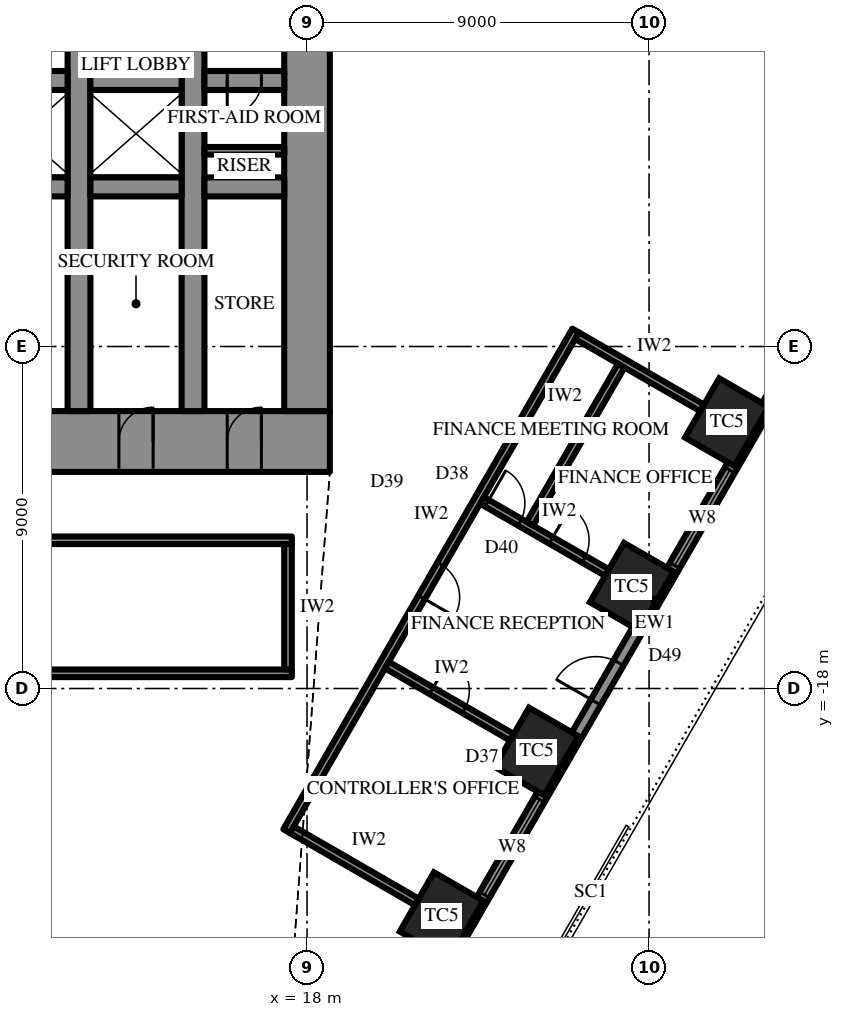
"""IFC4 building model, lengths in metres.
Left out: names, types, materials, properties, quantities, classifications, styles, units other than length and angle.
Written with IfcOpenShell. Run it as: python <this file> out.ifc"""

import sys

from ifc_helpers import new_model, si_unit, direction, frame, frame_2d, origin, origin_2d, place, context, subcontext, project, spatial, rectangle, extrude, element, fill, save


model = new_model("IFC4")
c1 = context("Model", 3, precision=1e-05, world=origin(), true_north=direction((0.0, 1.0)))
c2 = subcontext(c1, "Body", "Model", "MODEL_VIEW")
j1 = project(units=[si_unit("LENGTHUNIT", "METRE"), si_unit("PLANEANGLEUNIT", "RADIAN")], contexts=[c1])
p1 = place(None, origin())
s1 = spatial("IfcSite", under=j1, at=p1, CompositionType="ELEMENT")
p2 = place(p1, origin())
s2 = spatial("IfcBuilding", under=s1, at=p2, CompositionType="ELEMENT")
p3 = place(p2, frame((0.0, 0.0, 127.9)))
s3 = spatial("IfcBuildingStorey", under=s2, at=p3, CompositionType="ELEMENT", Elevation=127.9)
for number, where, z_axis, x_axis in (
    (1, (21.54, -23.992, 0.0), (0.0, 0.0, 1.0), (0.5, 0.866, 0.0)),
    (2, (24.042, -19.658, 0.0), (0.0, 0.0, 1.0), (0.5, 0.866, 0.0)),
    (3, (26.544, -15.325, 0.0), (0.0, 0.0, 1.0), (0.5, 0.866, 0.0)),
    (4, (29.045, -10.992, 0.0), (0.0, 0.0, 1.0), (0.5, 0.866, 0.0)),
):
    element("IfcColumn", number, at=place(p3, frame(where, z_axis=z_axis, x_axis=x_axis)), inside=s3, PredefinedType="COLUMN", context=c2, shape_type="SweptSolid", body=[
        extrude(rectangle(XDim=1.8, YDim=1.5, at=origin_2d()), origin(), (0.0, 0.0, 1.0), 4.2),
    ])
p4 = place(p3, frame((18.6, -11.5, 0.0), z_axis=(0.0, 0.0, 1.0), x_axis=(-1.0, 0.0, 0.0)))
e5 = element("IfcWall", 5, at=p4, inside=s3, PredefinedType="SHEAR", context=c2, shape_type="SweptSolid", body=[
    extrude(rectangle(XDim=37.2, YDim=1.6, at=frame_2d((18.6, 0.0))), origin(), (0.0, 0.0, 1.0), 4.2),
])
p5 = place(p4, frame((19.45, 0.0, 0.0)))
e6 = element("IfcOpeningElement", 6, at=p5, cuts=e5, PredefinedType="OPENING", context=c2, shape_type="SweptSolid", body=[
    extrude(rectangle(XDim=0.9, YDim=2.2, at=frame_2d((0.45, 1.1))), frame((0.0, 0.81, 0.0), z_axis=(0.0, -1.0, 0.0), x_axis=(1.0, 0.0, 0.0)), (0.0, 0.0, 1.0), 1.62),
])
p6 = place(p4, frame((22.45, 0.0, 0.0)))
e7 = element("IfcOpeningElement", 7, at=p6, cuts=e5, PredefinedType="OPENING", context=c2, shape_type="SweptSolid", body=[
    extrude(rectangle(XDim=0.9, YDim=2.2, at=frame_2d((0.45, 1.1))), frame((0.0, 0.81, 0.0), z_axis=(0.0, -1.0, 0.0), x_axis=(1.0, 0.0, 0.0)), (0.0, 0.0, 1.0), 1.62),
])
p7 = place(p4, frame((25.5, 0.0, 0.0)))
e8 = element("IfcOpeningElement", 8, at=p7, cuts=e5, PredefinedType="OPENING", context=c2, shape_type="SweptSolid", body=[
    extrude(rectangle(XDim=1.0, YDim=2.2, at=frame_2d((0.5, 1.1))), frame((0.0, 0.81, 0.0), z_axis=(0.0, -1.0, 0.0), x_axis=(1.0, 0.0, 0.0)), (0.0, 0.0, 1.0), 1.62),
])
p8 = place(p4, frame((1.8, 0.0, 0.0)))
e9 = element("IfcOpeningElement", 9, at=p8, cuts=e5, PredefinedType="OPENING", context=c2, shape_type="SweptSolid", body=[
    extrude(rectangle(XDim=0.9, YDim=2.2, at=frame_2d((0.45, 1.1))), frame((0.0, 0.81, 0.0), z_axis=(0.0, -1.0, 0.0), x_axis=(1.0, 0.0, 0.0)), (0.0, 0.0, 1.0), 1.62),
])
p9 = place(p4, frame((4.65, 0.0, 0.0)))
e10 = element("IfcOpeningElement", 10, at=p9, cuts=e5, PredefinedType="OPENING", context=c2, shape_type="SweptSolid", body=[
    extrude(rectangle(XDim=0.9, YDim=2.2, at=frame_2d((0.45, 1.1))), frame((0.0, 0.81, 0.0), z_axis=(0.0, -1.0, 0.0), x_axis=(1.0, 0.0, 0.0)), (0.0, 0.0, 1.0), 1.62),
])
p10 = place(p4, frame((7.75, 0.0, 0.0)))
e11 = element("IfcOpeningElement", 11, at=p10, cuts=e5, PredefinedType="OPENING", context=c2, shape_type="SweptSolid", body=[
    extrude(rectangle(XDim=0.9, YDim=2.2, at=frame_2d((0.45, 1.1))), frame((0.0, 0.81, 0.0), z_axis=(0.0, -1.0, 0.0), x_axis=(1.0, 0.0, 0.0)), (0.0, 0.0, 1.0), 1.62),
])
p11 = place(p4, frame((28.55, 0.0, 0.0)))
e12 = element("IfcOpeningElement", 12, at=p11, cuts=e5, PredefinedType="OPENING", context=c2, shape_type="SweptSolid", body=[
    extrude(rectangle(XDim=0.9, YDim=2.2, at=frame_2d((0.45, 1.1))), frame((0.0, 0.81, 0.0), z_axis=(0.0, -1.0, 0.0), x_axis=(1.0, 0.0, 0.0)), (0.0, 0.0, 1.0), 1.62),
])
p12 = place(p4, frame((31.65, 0.0, 0.0)))
e13 = element("IfcOpeningElement", 13, at=p12, cuts=e5, PredefinedType="OPENING", context=c2, shape_type="SweptSolid", body=[
    extrude(rectangle(XDim=0.9, YDim=2.2, at=frame_2d((0.45, 1.1))), frame((0.0, 0.81, 0.0), z_axis=(0.0, -1.0, 0.0), x_axis=(1.0, 0.0, 0.0)), (0.0, 0.0, 1.0), 1.62),
])
p13 = place(p4, frame((34.5, 0.0, 0.0)))
e14 = element("IfcOpeningElement", 14, at=p13, cuts=e5, PredefinedType="OPENING", context=c2, shape_type="SweptSolid", body=[
    extrude(rectangle(XDim=0.9, YDim=2.2, at=frame_2d((0.45, 1.1))), frame((0.0, 0.81, 0.0), z_axis=(0.0, -1.0, 0.0), x_axis=(1.0, 0.0, 0.0)), (0.0, 0.0, 1.0), 1.62),
])
p14 = place(p3, frame((18.0, -10.7, 0.0), z_axis=(0.0, 0.0, 1.0), x_axis=(0.0, 1.0, 0.0)))
e15 = element("IfcWall", 15, at=p14, inside=s3, PredefinedType="SHEAR", context=c2, shape_type="SweptSolid", body=[
    extrude(rectangle(XDim=21.4, YDim=1.2, at=frame_2d((10.7, 0.0))), origin(), (0.0, 0.0, 1.0), 4.2),
])
p15 = place(p14, frame((9.8, 0.0, 0.0)))
e16 = element("IfcOpeningElement", 16, at=p15, cuts=e15, PredefinedType="OPENING", context=c2, shape_type="SweptSolid", body=[
    extrude(rectangle(XDim=1.8, YDim=2.4, at=frame_2d((0.9, 1.2))), frame((0.0, 0.61, 0.0), z_axis=(0.0, -1.0, 0.0), x_axis=(1.0, 0.0, 0.0)), (0.0, 0.0, 1.0), 1.22),
])
p16 = place(p3, frame((12.0, -10.7, 0.0), z_axis=(0.0, 0.0, 1.0), x_axis=(0.0, 1.0, 0.0)))
e17 = element("IfcWall", 17, at=p16, inside=s3, PredefinedType="SHEAR", context=c2, shape_type="SweptSolid", body=[
    extrude(rectangle(XDim=21.4, YDim=0.6, at=frame_2d((10.7, 0.0))), origin(), (0.0, 0.0, 1.0), 4.2),
])
p17 = place(p16, frame((9.8, 0.0, 0.0)))
e18 = element("IfcOpeningElement", 18, at=p17, cuts=e17, PredefinedType="OPENING", context=c2, shape_type="SweptSolid", body=[
    extrude(rectangle(XDim=1.8, YDim=2.4, at=frame_2d((0.9, 1.2))), frame((0.0, 0.31, 0.0), z_axis=(0.0, -1.0, 0.0), x_axis=(1.0, 0.0, 0.0)), (0.0, 0.0, 1.0), 0.62),
])
p18 = place(p3, frame((15.0, -10.7, 0.0), z_axis=(0.0, 0.0, 1.0), x_axis=(0.0, 1.0, 0.0)))
e19 = element("IfcWall", 19, at=p18, inside=s3, PredefinedType="SHEAR", context=c2, shape_type="SweptSolid", body=[
    extrude(rectangle(XDim=21.4, YDim=0.6, at=frame_2d((10.7, 0.0))), origin(), (0.0, 0.0, 1.0), 4.2),
])
p19 = place(p18, frame((9.8, 0.0, 0.0)))
e20 = element("IfcOpeningElement", 20, at=p19, cuts=e19, PredefinedType="OPENING", context=c2, shape_type="SweptSolid", body=[
    extrude(rectangle(XDim=1.8, YDim=2.4, at=frame_2d((0.9, 1.2))), frame((0.0, 0.31, 0.0), z_axis=(0.0, -1.0, 0.0), x_axis=(1.0, 0.0, 0.0)), (0.0, 0.0, 1.0), 0.62),
])
p20 = place(p3, frame((17.4, -2.0, 0.0), z_axis=(0.0, 0.0, 1.0), x_axis=(-1.0, 0.0, 0.0)))
e21 = element("IfcWall", 21, at=p20, inside=s3, PredefinedType="SHEAR", context=c2, shape_type="SweptSolid", body=[
    extrude(rectangle(XDim=2.1, YDim=0.5, at=frame_2d((1.05, 0.0))), origin(), (0.0, 0.0, 1.0), 4.2),
])
p21 = place(p20, frame((0.6, 0.0, 0.0)))
e22 = element("IfcOpeningElement", 22, at=p21, cuts=e21, PredefinedType="OPENING", context=c2, shape_type="SweptSolid", body=[
    extrude(rectangle(XDim=0.9, YDim=2.2, at=frame_2d((0.45, 1.1))), frame((0.0, 0.26, 0.0), z_axis=(0.0, -1.0, 0.0), x_axis=(1.0, 0.0, 0.0)), (0.0, 0.0, 1.0), 0.52),
])
p22 = place(p3, frame((14.7, -2.0, 0.0), z_axis=(0.0, 0.0, 1.0), x_axis=(-1.0, 0.0, 0.0)))
e23 = element("IfcWall", 23, at=p22, inside=s3, PredefinedType="SHEAR", context=c2, shape_type="SweptSolid", body=[
    extrude(rectangle(XDim=2.4, YDim=0.5, at=frame_2d((1.2, 0.0))), origin(), (0.0, 0.0, 1.0), 4.2),
])
p23 = place(p3, frame((11.7, -2.0, 0.0), z_axis=(0.0, 0.0, 1.0), x_axis=(-1.0, 0.0, 0.0)))
e24 = element("IfcWall", 24, at=p23, inside=s3, PredefinedType="SHEAR", context=c2, shape_type="SweptSolid", body=[
    extrude(rectangle(XDim=5.9, YDim=0.5, at=frame_2d((2.95, 0.0))), origin(), (0.0, 0.0, 1.0), 4.2),
])
p24 = place(p3, frame((17.4, -4.8, 0.0), z_axis=(0.0, 0.0, 1.0), x_axis=(-1.0, 0.0, 0.0)))
e25 = element("IfcWall", 25, at=p24, inside=s3, PredefinedType="SHEAR", context=c2, shape_type="SweptSolid", body=[
    extrude(rectangle(XDim=2.1, YDim=0.5, at=frame_2d((1.05, 0.0))), origin(), (0.0, 0.0, 1.0), 4.2),
])
p25 = place(p3, frame((14.7, -4.8, 0.0), z_axis=(0.0, 0.0, 1.0), x_axis=(-1.0, 0.0, 0.0)))
e26 = element("IfcWall", 26, at=p25, inside=s3, PredefinedType="SHEAR", context=c2, shape_type="SweptSolid", body=[
    extrude(rectangle(XDim=2.4, YDim=0.5, at=frame_2d((1.2, 0.0))), origin(), (0.0, 0.0, 1.0), 4.2),
])
p26 = place(p3, frame((11.7, -4.8, 0.0), z_axis=(0.0, 0.0, 1.0), x_axis=(-1.0, 0.0, 0.0)))
e27 = element("IfcWall", 27, at=p26, inside=s3, PredefinedType="SHEAR", context=c2, shape_type="SweptSolid", body=[
    extrude(rectangle(XDim=23.4, YDim=0.5, at=frame_2d((11.7, 0.0))), origin(), (0.0, 0.0, 1.0), 4.2),
])
p27 = place(p26, frame((6.6, 0.0, 0.0)))
e28 = element("IfcOpeningElement", 28, at=p27, cuts=e27, PredefinedType="OPENING", context=c2, shape_type="SweptSolid", body=[
    extrude(rectangle(XDim=1.2, YDim=2.2, at=frame_2d((0.6, 1.1))), frame((0.0, 0.26, 0.0), z_axis=(0.0, -1.0, 0.0), x_axis=(1.0, 0.0, 0.0)), (0.0, 0.0, 1.0), 0.52),
])
p28 = place(p26, frame((3.6, 0.0, 0.0)))
e29 = element("IfcOpeningElement", 29, at=p28, cuts=e27, PredefinedType="OPENING", context=c2, shape_type="SweptSolid", body=[
    extrude(rectangle(XDim=1.2, YDim=2.2, at=frame_2d((0.6, 1.1))), frame((0.0, 0.26, 0.0), z_axis=(0.0, -1.0, 0.0), x_axis=(1.0, 0.0, 0.0)), (0.0, 0.0, 1.0), 0.52),
])
p29 = place(p3, frame((19.644, -28.675, 0.0), z_axis=(0.0, 0.0, 1.0), x_axis=(0.500003084452, 0.866023622968, 0.0)))
e30 = element("IfcWall", 30, at=p29, inside=s3, PredefinedType="SOLIDWALL", context=c2, shape_type="SweptSolid", body=[
    extrude(rectangle(XDim=30.022, YDim=0.3, at=frame_2d((15.011, 0.0))), origin(), (0.0, 0.0, 1.0), 2.3),
])
p30 = place(p29, frame((1.052, 0.0, 0.6)))
e31 = element("IfcOpeningElement", 31, at=p30, cuts=e30, PredefinedType="OPENING", context=c2, shape_type="SweptSolid", body=[
    extrude(rectangle(XDim=2.9, YDim=1.45, at=frame_2d((1.45, 0.725))), frame((0.0, 0.16, 0.0), z_axis=(0.0, -1.0, 0.0), x_axis=(1.0, 0.0, 0.0)), (0.0, 0.0, 1.0), 0.32),
])
p31 = place(p29, frame((6.056, 0.0, 0.6)))
e32 = element("IfcOpeningElement", 32, at=p31, cuts=e30, PredefinedType="OPENING", context=c2, shape_type="SweptSolid", body=[
    extrude(rectangle(XDim=2.9, YDim=1.45, at=frame_2d((1.45, 0.725))), frame((0.0, 0.16, 0.0), z_axis=(0.0, -1.0, 0.0), x_axis=(1.0, 0.0, 0.0)), (0.0, 0.0, 1.0), 0.32),
])
p32 = place(p29, frame((11.909, 0.0, 0.0)))
e33 = element("IfcOpeningElement", 33, at=p32, cuts=e30, PredefinedType="OPENING", context=c2, shape_type="SweptSolid", body=[
    extrude(rectangle(XDim=1.2, YDim=2.2, at=frame_2d((0.6, 1.1))), frame((0.0, 0.16, 0.0), z_axis=(0.0, -1.0, 0.0), x_axis=(1.0, 0.0, 0.0)), (0.0, 0.0, 1.0), 0.32),
])
p33 = place(p29, frame((16.063, 0.0, 0.6)))
e34 = element("IfcOpeningElement", 34, at=p33, cuts=e30, PredefinedType="OPENING", context=c2, shape_type="SweptSolid", body=[
    extrude(rectangle(XDim=2.9, YDim=1.45, at=frame_2d((1.45, 0.725))), frame((0.0, 0.16, 0.0), z_axis=(0.0, -1.0, 0.0), x_axis=(1.0, 0.0, 0.0)), (0.0, 0.0, 1.0), 0.32),
])
p34 = place(p29, frame((21.067, 0.0, 0.6)))
e35 = element("IfcOpeningElement", 35, at=p34, cuts=e30, PredefinedType="OPENING", context=c2, shape_type="SweptSolid", body=[
    extrude(rectangle(XDim=2.9, YDim=1.45, at=frame_2d((1.45, 0.725))), frame((0.0, 0.16, 0.0), z_axis=(0.0, -1.0, 0.0), x_axis=(1.0, 0.0, 0.0)), (0.0, 0.0, 1.0), 0.32),
])
p35 = place(p29, frame((26.07, 0.0, 0.6)))
e36 = element("IfcOpeningElement", 36, at=p35, cuts=e30, PredefinedType="OPENING", context=c2, shape_type="SweptSolid", body=[
    extrude(rectangle(XDim=2.9, YDim=1.45, at=frame_2d((1.45, 0.725))), frame((0.0, 0.16, 0.0), z_axis=(0.0, -1.0, 0.0), x_axis=(1.0, 0.0, 0.0)), (0.0, 0.0, 1.0), 0.32),
])
p36 = place(p3, frame((17.4, -3.85, 0.0), z_axis=(0.0, 0.0, 1.0), x_axis=(-1.0, 0.0, 0.0)))
e37 = element("IfcWall", 37, at=p36, inside=s3, PredefinedType="PARTITIONING", context=c2, shape_type="SweptSolid", body=[
    extrude(rectangle(XDim=2.1, YDim=0.2, at=frame_2d((1.05, 0.0))), origin(), (0.0, 0.0, 1.0), 4.0),
])
p37 = place(p3, frame((17.6, -14.1, 0.0), z_axis=(0.0, 0.0, 1.0), x_axis=(-1.0, 0.0, 0.0)))
e38 = element("IfcWall", 38, at=p37, inside=s3, PredefinedType="PARTITIONING", context=c2, shape_type="SweptSolid", body=[
    extrude(rectangle(XDim=35.2, YDim=0.2, at=frame_2d((17.6, 0.0))), origin(), (0.0, 0.0, 1.0), 4.0),
])
p38 = place(p3, frame((17.6, -17.6, 0.0), z_axis=(0.0, 0.0, 1.0), x_axis=(-1.0, 0.0, 0.0)))
e39 = element("IfcWall", 39, at=p38, inside=s3, PredefinedType="PARTITIONING", context=c2, shape_type="SweptSolid", body=[
    extrude(rectangle(XDim=35.2, YDim=0.2, at=frame_2d((17.6, 0.0))), origin(), (0.0, 0.0, 1.0), 4.0),
])
p39 = place(p38, frame((7.95, 0.0, 0.0)))
e40 = element("IfcOpeningElement", 40, at=p39, cuts=e39, PredefinedType="OPENING", context=c2, shape_type="SweptSolid", body=[
    extrude(rectangle(XDim=1.8, YDim=2.4, at=frame_2d((0.9, 1.2))), frame((0.0, 0.11, 0.0), z_axis=(0.0, -1.0, 0.0), x_axis=(1.0, 0.0, 0.0)), (0.0, 0.0, 1.0), 0.22),
])
p40 = place(p38, frame((25.45, 0.0, 0.0)))
e41 = element("IfcOpeningElement", 41, at=p40, cuts=e39, PredefinedType="OPENING", context=c2, shape_type="SweptSolid", body=[
    extrude(rectangle(XDim=1.8, YDim=2.4, at=frame_2d((0.9, 1.2))), frame((0.0, 0.11, 0.0), z_axis=(0.0, -1.0, 0.0), x_axis=(1.0, 0.0, 0.0)), (0.0, 0.0, 1.0), 0.22),
])
p41 = place(p3, frame((17.5, -14.2, 0.0), z_axis=(0.0, 0.0, 1.0), x_axis=(0.0, -1.0, 0.0)))
e42 = element("IfcWall", 42, at=p41, inside=s3, PredefinedType="PARTITIONING", context=c2, shape_type="SweptSolid", body=[
    extrude(rectangle(XDim=3.3, YDim=0.2, at=frame_2d((1.65, 0.0))), origin(), (0.0, 0.0, 1.0), 4.0),
])
p42 = place(p3, frame((17.463, -21.753, 0.0), z_axis=(0.0, 0.0, 1.0), x_axis=(0.500010972563, 0.86601906868, 0.0)))
e43 = element("IfcWall", 43, at=p42, inside=s3, PredefinedType="PARTITIONING", context=c2, shape_type="SweptSolid", body=[
    extrude(rectangle(XDim=15.211, YDim=0.2, at=frame_2d((7.605, 0.0))), origin(), (0.0, 0.0, 1.0), 4.0),
])
p43 = place(p42, frame((7.105, 0.0, 0.0)))
e44 = element("IfcOpeningElement", 44, at=p43, cuts=e43, PredefinedType="OPENING", context=c2, shape_type="SweptSolid", body=[
    extrude(rectangle(XDim=1.0, YDim=2.2, at=frame_2d((0.5, 1.1))), frame((0.0, 0.11, 0.0), z_axis=(0.0, -1.0, 0.0), x_axis=(1.0, 0.0, 0.0)), (0.0, 0.0, 1.0), 0.22),
])
p44 = place(p3, frame((17.6, -21.717, 0.0), z_axis=(0.0, 0.0, 1.0), x_axis=(0.866000483506, -0.500043160704, 0.0)))
e45 = element("IfcWall", 45, at=p44, inside=s3, PredefinedType="PARTITIONING", context=c2, shape_type="SweptSolid", body=[
    extrude(rectangle(XDim=3.8, YDim=0.2, at=frame_2d((1.9, 0.0))), origin(), (0.0, 0.0, 1.0), 3.082),
])
p45 = place(p3, frame((20.101, -17.383, 0.0), z_axis=(0.0, 0.0, 1.0), x_axis=(0.86601654697, -0.500015340139, 0.0)))
e46 = element("IfcWall", 46, at=p45, inside=s3, PredefinedType="PARTITIONING", context=c2, shape_type="SweptSolid", body=[
    extrude(rectangle(XDim=3.8, YDim=0.2, at=frame_2d((1.9, 0.0))), origin(), (0.0, 0.0, 1.0), 3.082),
])
p46 = place(p45, frame((1.35, 0.0, 0.0)))
e47 = element("IfcOpeningElement", 47, at=p46, cuts=e46, PredefinedType="OPENING", context=c2, shape_type="SweptSolid", body=[
    extrude(rectangle(XDim=1.0, YDim=2.2, at=frame_2d((0.5, 1.1))), frame((0.0, 0.11, 0.0), z_axis=(0.0, -1.0, 0.0), x_axis=(1.0, 0.0, 0.0)), (0.0, 0.0, 1.0), 0.22),
])
p47 = place(p3, frame((22.603, -13.05, 0.0), z_axis=(0.0, 0.0, 1.0), x_axis=(0.866028304915, -0.499994975061, 0.0)))
e48 = element("IfcWall", 48, at=p47, inside=s3, PredefinedType="PARTITIONING", context=c2, shape_type="SweptSolid", body=[
    extrude(rectangle(XDim=3.8, YDim=0.2, at=frame_2d((1.9, 0.0))), origin(), (0.0, 0.0, 1.0), 4.0),
])
p48 = place(p47, frame((0.15, 0.0, 0.0)))
e49 = element("IfcOpeningElement", 49, at=p48, cuts=e48, PredefinedType="OPENING", context=c2, shape_type="SweptSolid", body=[
    extrude(rectangle(XDim=1.0, YDim=2.2, at=frame_2d((0.5, 1.1))), frame((0.0, 0.11, 0.0), z_axis=(0.0, -1.0, 0.0), x_axis=(1.0, 0.0, 0.0)), (0.0, 0.0, 1.0), 0.22),
])
p49 = place(p47, frame((2.1, 0.0, 0.0)))
e50 = element("IfcOpeningElement", 50, at=p49, cuts=e48, PredefinedType="OPENING", context=c2, shape_type="SweptSolid", body=[
    extrude(rectangle(XDim=1.0, YDim=2.2, at=frame_2d((0.5, 1.1))), frame((0.0, 0.11, 0.0), z_axis=(0.0, -1.0, 0.0), x_axis=(1.0, 0.0, 0.0)), (0.0, 0.0, 1.0), 0.22),
])
p50 = place(p3, frame((25.105, -8.717, 0.0), z_axis=(0.0, 0.0, 1.0), x_axis=(0.866000483506, -0.500043160704, 0.0)))
e51 = element("IfcWall", 51, at=p50, inside=s3, PredefinedType="PARTITIONING", context=c2, shape_type="SweptSolid", body=[
    extrude(rectangle(XDim=3.8, YDim=0.2, at=frame_2d((1.9, 0.0))), origin(), (0.0, 0.0, 1.0), 3.082),
])
p51 = place(p3, frame((23.866, -13.663, 0.0), z_axis=(0.0, 0.0, 1.0), x_axis=(0.499998147991, 0.86602647304, 0.0)))
e52 = element("IfcWall", 52, at=p51, inside=s3, PredefinedType="PARTITIONING", context=c2, shape_type="SweptSolid", body=[
    extrude(rectangle(XDim=4.804, YDim=0.2, at=frame_2d((2.402, 0.0))), origin(), (0.0, 0.0, 1.0), 4.0),
])
p52 = place(p31, origin())
e53 = element("IfcWindow", 53, at=p52, inside=s3, PartitioningType="SINGLE_PANEL", PredefinedType="WINDOW", context=c2, shape_type="SweptSolid", body=[
    extrude(rectangle(XDim=2.9, YDim=1.45, at=frame_2d((1.45, 0.725))), frame((0.0, 0.03, 0.0), z_axis=(0.0, -1.0, 0.0), x_axis=(1.0, 0.0, 0.0)), (0.0, 0.0, 1.0), 0.06),
])
fill(e32, e53)
p53 = place(p32, origin())
e54 = element("IfcDoor", 54, at=p53, inside=s3, OperationType="SINGLE_SWING_RIGHT", PredefinedType="DOOR", context=c2, shape_type="SweptSolid", body=[
    extrude(rectangle(XDim=1.2, YDim=2.2, at=frame_2d((0.6, 1.1))), frame((0.0, 0.025, 0.0), z_axis=(0.0, -1.0, 0.0), x_axis=(1.0, 0.0, 0.0)), (0.0, 0.0, 1.0), 0.05),
])
fill(e33, e54)
p54 = place(p33, origin())
e55 = element("IfcWindow", 55, at=p54, inside=s3, PartitioningType="SINGLE_PANEL", PredefinedType="WINDOW", context=c2, shape_type="SweptSolid", body=[
    extrude(rectangle(XDim=2.9, YDim=1.45, at=frame_2d((1.45, 0.725))), frame((0.0, 0.03, 0.0), z_axis=(0.0, -1.0, 0.0), x_axis=(1.0, 0.0, 0.0)), (0.0, 0.0, 1.0), 0.06),
])
fill(e34, e55)
p55 = place(p8, frame((0.9, 0.0, 0.0), z_axis=(0.0, 0.0, 1.0), x_axis=(-1.0, 0.0, 0.0)))
e56 = element("IfcDoor", 56, at=p55, inside=s3, OperationType="SINGLE_SWING_LEFT", PredefinedType="DOOR", context=c2, shape_type="SweptSolid", body=[
    extrude(rectangle(XDim=0.9, YDim=2.2, at=frame_2d((0.45, 1.1))), frame((0.0, 0.025, 0.0), z_axis=(0.0, -1.0, 0.0), x_axis=(1.0, 0.0, 0.0)), (0.0, 0.0, 1.0), 0.05),
])
fill(e9, e56)
p56 = place(p9, frame((0.9, 0.0, 0.0), z_axis=(0.0, 0.0, 1.0), x_axis=(-1.0, 0.0, 0.0)))
e57 = element("IfcDoor", 57, at=p56, inside=s3, OperationType="SINGLE_SWING_LEFT", PredefinedType="DOOR", context=c2, shape_type="SweptSolid", body=[
    extrude(rectangle(XDim=0.9, YDim=2.2, at=frame_2d((0.45, 1.1))), frame((0.0, 0.025, 0.0), z_axis=(0.0, -1.0, 0.0), x_axis=(1.0, 0.0, 0.0)), (0.0, 0.0, 1.0), 0.05),
])
fill(e10, e57)
p57 = place(p21, origin())
e58 = element("IfcDoor", 58, at=p57, inside=s3, OperationType="SINGLE_SWING_LEFT", PredefinedType="DOOR", context=c2, shape_type="SweptSolid", body=[
    extrude(rectangle(XDim=0.9, YDim=2.2, at=frame_2d((0.45, 1.1))), frame((0.0, 0.025, 0.0), z_axis=(0.0, -1.0, 0.0), x_axis=(1.0, 0.0, 0.0)), (0.0, 0.0, 1.0), 0.05),
])
fill(e22, e58)
p58 = place(p46, origin())
e59 = element("IfcDoor", 59, at=p58, inside=s3, OperationType="SINGLE_SWING_RIGHT", PredefinedType="DOOR", context=c2, shape_type="SweptSolid", body=[
    extrude(rectangle(XDim=1.0, YDim=2.2, at=frame_2d((0.5, 1.1))), frame((0.0, 0.025, 0.0), z_axis=(0.0, -1.0, 0.0), x_axis=(1.0, 0.0, 0.0)), (0.0, 0.0, 1.0), 0.05),
])
fill(e47, e59)
p59 = place(p43, frame((1.0, 0.0, 0.0), z_axis=(0.0, 0.0, 1.0), x_axis=(-1.0, 0.0, 0.0)))
e60 = element("IfcDoor", 60, at=p59, inside=s3, OperationType="SINGLE_SWING_LEFT", PredefinedType="DOOR", context=c2, shape_type="SweptSolid", body=[
    extrude(rectangle(XDim=1.0, YDim=2.2, at=frame_2d((0.5, 1.1))), frame((0.0, 0.025, 0.0), z_axis=(0.0, -1.0, 0.0), x_axis=(1.0, 0.0, 0.0)), (0.0, 0.0, 1.0), 0.05),
])
fill(e44, e60)
p60 = place(p48, origin())
e61 = element("IfcDoor", 61, at=p60, inside=s3, OperationType="SINGLE_SWING_RIGHT", PredefinedType="DOOR", context=c2, shape_type="SweptSolid", body=[
    extrude(rectangle(XDim=1.0, YDim=2.2, at=frame_2d((0.5, 1.1))), frame((0.0, 0.025, 0.0), z_axis=(0.0, -1.0, 0.0), x_axis=(1.0, 0.0, 0.0)), (0.0, 0.0, 1.0), 0.05),
])
fill(e49, e61)
p61 = place(p49, origin())
e62 = element("IfcDoor", 62, at=p61, inside=s3, OperationType="SINGLE_SWING_RIGHT", PredefinedType="DOOR", context=c2, shape_type="SweptSolid", body=[
    extrude(rectangle(XDim=1.0, YDim=2.2, at=frame_2d((0.5, 1.1))), frame((0.0, 0.025, 0.0), z_axis=(0.0, -1.0, 0.0), x_axis=(1.0, 0.0, 0.0)), (0.0, 0.0, 1.0), 0.05),
])
fill(e50, e62)
save(model, sys.argv[1])
